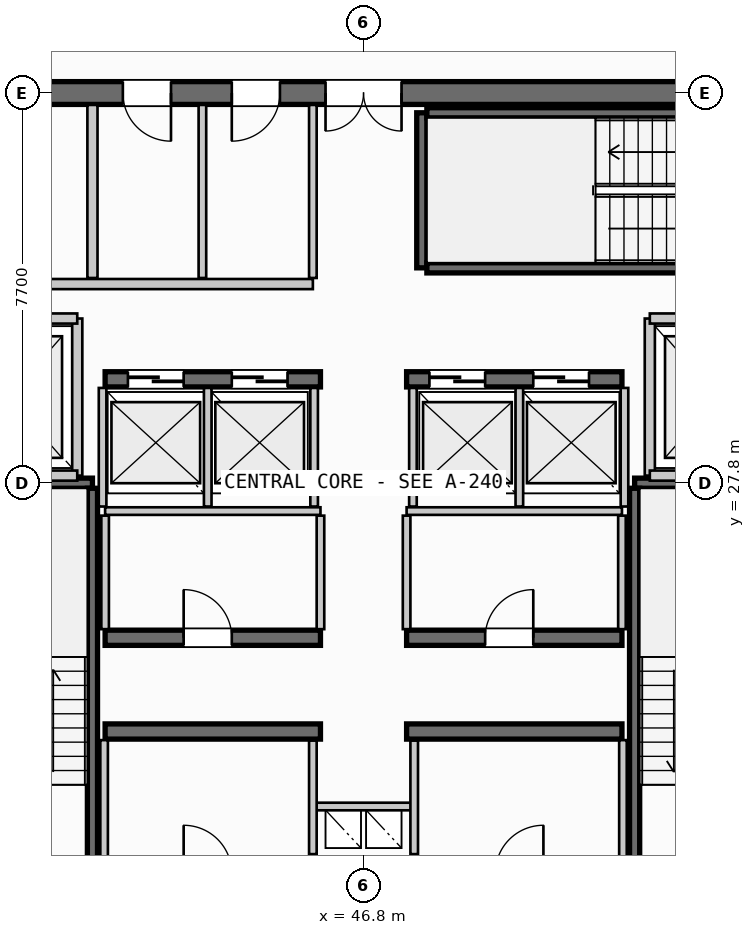
"""IFC4 building model, lengths in metres.
Left out: names, types, materials, properties, quantities, classifications, styles, units other than length and angle.
Written with IfcOpenShell. Run it as: python <this file> out.ifc"""

import sys

from ifc_helpers import new_model, si_unit, direction, frame, frame_2d, origin, place, context, subcontext, project, spatial, rectangle, extrude, source, transform, mapped, element, fill, save


model = new_model("IFC4")
c1 = context("Model", 3, precision=1e-05, world=origin(), true_north=direction((0.0, 1.0)))
c2 = subcontext(c1, "Body", "Model", "MODEL_VIEW")
j1 = project(units=[si_unit("LENGTHUNIT", "METRE"), si_unit("PLANEANGLEUNIT", "RADIAN")], contexts=[c1])
p1 = place(None, origin())
s1 = spatial("IfcSite", under=j1, at=p1, CompositionType="ELEMENT")
p2 = place(p1, origin())
s2 = spatial("IfcBuilding", under=s1, at=p2, CompositionType="ELEMENT")
p3 = place(p2, frame((0.0, 0.0, 290.5)))
s3 = spatial("IfcBuildingStorey", under=s2, at=p3, CompositionType="ELEMENT", Elevation=290.5)
p4 = place(p3, frame((55.6, 35.5, 0.0), z_axis=(0.0, 0.0, 1.0), x_axis=(-1.0, 0.0, 0.0)))
e1 = element("IfcWall", 1, at=p4, inside=s3, PredefinedType="SHEAR", context=c2, shape_type="SweptSolid", body=[
    extrude(rectangle(XDim=17.6, YDim=0.45, at=frame_2d((8.8, 0.0))), origin(), (0.0, 0.0, 1.0), 3.21),
])
p5 = place(p4, frame((8.05, 0.0, 0.0)))
e2 = element("IfcOpeningElement", 2, at=p5, cuts=e1, PredefinedType="OPENING", context=c2, shape_type="SweptSolid", body=[
    extrude(rectangle(XDim=1.5, YDim=2.2, at=frame_2d((0.75, 1.1))), frame((0.0, 0.235, 0.0), z_axis=(0.0, -1.0, 0.0), x_axis=(1.0, 0.0, 0.0)), (0.0, 0.0, 1.0), 0.47),
])
p6 = place(p4, frame((15.1, 0.0, 0.0)))
e3 = element("IfcOpeningElement", 3, at=p6, cuts=e1, PredefinedType="OPENING", context=c2, shape_type="SweptSolid", body=[
    extrude(rectangle(XDim=0.95, YDim=2.15, at=frame_2d((0.475, 1.075))), frame((0.0, 0.235, 0.0), z_axis=(0.0, -1.0, 0.0), x_axis=(1.0, 0.0, 0.0)), (0.0, 0.0, 1.0), 0.47),
])
p7 = place(p4, frame((12.6, 0.0, 0.0)))
e4 = element("IfcOpeningElement", 4, at=p7, cuts=e1, PredefinedType="OPENING", context=c2, shape_type="SweptSolid", body=[
    extrude(rectangle(XDim=0.95, YDim=2.15, at=frame_2d((0.475, 1.075))), frame((0.0, 0.235, 0.0), z_axis=(0.0, -1.0, 0.0), x_axis=(1.0, 0.0, 0.0)), (0.0, 0.0, 1.0), 0.47),
])
p8 = place(p4, frame((10.45, 0.0, 0.0)))
e5 = element("IfcOpeningElement", 5, at=p8, cuts=e1, PredefinedType="OPENING", context=c2, shape_type="SweptSolid", body=[
    extrude(rectangle(XDim=0.95, YDim=2.15, at=frame_2d((0.475, 1.075))), frame((0.0, 0.235, 0.0), z_axis=(0.0, -1.0, 0.0), x_axis=(1.0, 0.0, 0.0)), (0.0, 0.0, 1.0), 0.47),
])
for number, where, z_axis, x_axis in (
    (6, (41.7, 22.9, 0.0), (0.0, 0.0, 1.0), (1.0, 0.0, 0.0)),
    (7, (47.65, 22.9, 0.0), (0.0, 0.0, 1.0), (1.0, 0.0, 0.0)),
):
    element("IfcWall", number, at=place(p3, frame(where, z_axis=z_axis, x_axis=x_axis)), inside=s3, PredefinedType="SHEAR", context=c2, shape_type="SweptSolid", body=[
        extrude(rectangle(XDim=4.25, YDim=0.3, at=frame_2d((2.125, 0.0))), origin(), (0.0, 0.0, 1.0), 3.21),
    ])
p9 = place(p3, frame((41.7, 24.75, 0.0), z_axis=(0.0, 0.0, 1.0), x_axis=(1.0, 0.0, 0.0)))
e8 = element("IfcWall", 8, at=p9, inside=s3, PredefinedType="SHEAR", context=c2, shape_type="SweptSolid", body=[
    extrude(rectangle(XDim=4.25, YDim=0.3, at=frame_2d((2.125, 0.0))), origin(), (0.0, 0.0, 1.0), 3.21),
])
p10 = place(p9, frame((1.55, 0.0, 0.0)))
e9 = element("IfcOpeningElement", 9, at=p10, cuts=e8, PredefinedType="OPENING", context=c2, shape_type="SweptSolid", body=[
    extrude(rectangle(XDim=0.95, YDim=2.15, at=frame_2d((0.475, 1.075))), frame((0.0, 0.16, 0.0), z_axis=(0.0, -1.0, 0.0), x_axis=(1.0, 0.0, 0.0)), (0.0, 0.0, 1.0), 0.32),
])
p11 = place(p3, frame((47.65, 24.75, 0.0), z_axis=(0.0, 0.0, 1.0), x_axis=(1.0, 0.0, 0.0)))
e10 = element("IfcWall", 10, at=p11, inside=s3, PredefinedType="SHEAR", context=c2, shape_type="SweptSolid", body=[
    extrude(rectangle(XDim=4.25, YDim=0.3, at=frame_2d((2.125, 0.0))), origin(), (0.0, 0.0, 1.0), 3.21),
])
p12 = place(p11, frame((1.55, 0.0, 0.0)))
e11 = element("IfcOpeningElement", 11, at=p12, cuts=e10, PredefinedType="OPENING", context=c2, shape_type="SweptSolid", body=[
    extrude(rectangle(XDim=0.95, YDim=2.15, at=frame_2d((0.475, 1.075))), frame((0.0, 0.16, 0.0), z_axis=(0.0, -1.0, 0.0), x_axis=(1.0, 0.0, 0.0)), (0.0, 0.0, 1.0), 0.32),
])
p13 = place(p3, frame((41.7, 29.85, 0.0), z_axis=(0.0, 0.0, 1.0), x_axis=(1.0, 0.0, 0.0)))
e12 = element("IfcWall", 12, at=p13, inside=s3, PredefinedType="SHEAR", context=c2, shape_type="SweptSolid", body=[
    extrude(rectangle(XDim=4.25, YDim=0.3, at=frame_2d((2.125, 0.0))), origin(), (0.0, 0.0, 1.0), 3.21),
])
p14 = place(p13, frame((0.45, 0.0, 0.0)))
e13 = element("IfcOpeningElement", 13, at=p14, cuts=e12, PredefinedType="OPENING", context=c2, shape_type="SweptSolid", body=[
    extrude(rectangle(XDim=1.1, YDim=2.2, at=frame_2d((0.55, 1.1))), frame((0.0, 0.16, 0.0), z_axis=(0.0, -1.0, 0.0), x_axis=(1.0, 0.0, 0.0)), (0.0, 0.0, 1.0), 0.32),
])
p15 = place(p13, frame((2.5, 0.0, 0.0)))
e14 = element("IfcOpeningElement", 14, at=p15, cuts=e12, PredefinedType="OPENING", context=c2, shape_type="SweptSolid", body=[
    extrude(rectangle(XDim=1.1, YDim=2.2, at=frame_2d((0.55, 1.1))), frame((0.0, 0.16, 0.0), z_axis=(0.0, -1.0, 0.0), x_axis=(1.0, 0.0, 0.0)), (0.0, 0.0, 1.0), 0.32),
])
p16 = place(p3, frame((47.65, 29.85, 0.0), z_axis=(0.0, 0.0, 1.0), x_axis=(1.0, 0.0, 0.0)))
e15 = element("IfcWall", 15, at=p16, inside=s3, PredefinedType="SHEAR", context=c2, shape_type="SweptSolid", body=[
    extrude(rectangle(XDim=4.25, YDim=0.3, at=frame_2d((2.125, 0.0))), origin(), (0.0, 0.0, 1.0), 3.21),
])
p17 = place(p16, frame((0.45, 0.0, 0.0)))
e16 = element("IfcOpeningElement", 16, at=p17, cuts=e15, PredefinedType="OPENING", context=c2, shape_type="SweptSolid", body=[
    extrude(rectangle(XDim=1.1, YDim=2.2, at=frame_2d((0.55, 1.1))), frame((0.0, 0.16, 0.0), z_axis=(0.0, -1.0, 0.0), x_axis=(1.0, 0.0, 0.0)), (0.0, 0.0, 1.0), 0.32),
])
p18 = place(p16, frame((2.5, 0.0, 0.0)))
e17 = element("IfcOpeningElement", 17, at=p18, cuts=e15, PredefinedType="OPENING", context=c2, shape_type="SweptSolid", body=[
    extrude(rectangle(XDim=1.1, YDim=2.2, at=frame_2d((0.55, 1.1))), frame((0.0, 0.16, 0.0), z_axis=(0.0, -1.0, 0.0), x_axis=(1.0, 0.0, 0.0)), (0.0, 0.0, 1.0), 0.32),
])
p19 = place(p3, frame((38.39, 27.8, 0.0), z_axis=(0.0, 0.0, 1.0), x_axis=(1.0, 0.0, 0.0)))
e18 = element("IfcWall", 18, at=p19, inside=s3, PredefinedType="SHEAR", context=c2, shape_type="SweptSolid", body=[
    extrude(rectangle(XDim=3.06, YDim=0.2, at=frame_2d((1.53, 0.0))), origin(), (0.0, 0.0, 1.0), 3.21),
])
p20 = place(p3, frame((41.45, 27.7, 0.0), z_axis=(0.0, 0.0, 1.0), x_axis=(0.0, -1.0, 0.0)))
e19 = element("IfcWall", 19, at=p20, inside=s3, PredefinedType="SHEAR", context=c2, shape_type="SweptSolid", body=[
    extrude(rectangle(XDim=7.35, YDim=0.2, at=frame_2d((3.675, 0.0))), origin(), (0.0, 0.0, 1.0), 3.21),
])
p21 = place(p3, frame((52.15, 27.8, 0.0), z_axis=(0.0, 0.0, 1.0), x_axis=(1.0, 0.0, 0.0)))
e20 = element("IfcWall", 20, at=p21, inside=s3, PredefinedType="SHEAR", context=c2, shape_type="SweptSolid", body=[
    extrude(rectangle(XDim=3.06, YDim=0.2, at=frame_2d((1.53, 0.0))), origin(), (0.0, 0.0, 1.0), 3.21),
])
p22 = place(p3, frame((52.15, 20.35, 0.0), z_axis=(0.0, 0.0, 1.0), x_axis=(0.0, 1.0, 0.0)))
e21 = element("IfcWall", 21, at=p22, inside=s3, PredefinedType="SHEAR", context=c2, shape_type="SweptSolid", body=[
    extrude(rectangle(XDim=7.35, YDim=0.2, at=frame_2d((3.675, 0.0))), origin(), (0.0, 0.0, 1.0), 3.21),
])
p23 = place(p3, frame((47.95, 32.05, 0.0), z_axis=(0.0, 0.0, 1.0), x_axis=(0.0, 1.0, 0.0)))
e22 = element("IfcWall", 22, at=p23, inside=s3, PredefinedType="SHEAR", context=c2, shape_type="SweptSolid", body=[
    extrude(rectangle(XDim=3.06, YDim=0.2, at=frame_2d((1.53, 0.0))), origin(), (0.0, 0.0, 1.0), 3.21),
])
for number, where, z_axis, x_axis in (
    (23, (48.05, 35.11, 0.0), (0.0, 0.0, 1.0), (1.0, 0.0, 0.0)),
    (24, (55.4, 32.05, 0.0), (0.0, 0.0, 1.0), (-1.0, 0.0, 0.0)),
):
    element("IfcWall", number, at=place(p3, frame(where, z_axis=z_axis, x_axis=x_axis)), inside=s3, PredefinedType="SHEAR", context=c2, shape_type="SweptSolid", body=[
        extrude(rectangle(XDim=7.35, YDim=0.2, at=frame_2d((3.675, 0.0))), origin(), (0.0, 0.0, 1.0), 3.21),
    ])
p24 = place(p3, frame((45.8, 21.42, 0.0), z_axis=(0.0, 0.0, 1.0), x_axis=(1.0, 0.0, 0.0)))
e25 = element("IfcWall", 25, at=p24, inside=s3, PredefinedType="PARTITIONING", context=c2, shape_type="SweptSolid", body=[
    extrude(rectangle(XDim=2.0, YDim=0.15, at=frame_2d((1.0, 0.0))), origin(), (0.0, 0.0, 1.0), 2.315),
])
for number, where, z_axis, x_axis in (
    (26, (45.8, 20.48, 0.0), (0.0, 0.0, 1.0), (0.0, 1.0, 0.0)),
    (27, (47.8, 20.48, 0.0), (0.0, 0.0, 1.0), (0.0, 1.0, 0.0)),
):
    element("IfcWall", number, at=place(p3, frame(where, z_axis=z_axis, x_axis=x_axis)), inside=s3, PredefinedType="PARTITIONING", context=c2, shape_type="SweptSolid", body=[
        extrude(rectangle(XDim=2.24, YDim=0.15, at=frame_2d((1.12, 0.0))), origin(), (0.0, 0.0, 1.0), 2.315),
    ])
p25 = place(p3, frame((41.15, 27.95, 0.0), z_axis=(0.0, 0.0, 1.0), x_axis=(0.0, 1.0, 0.0)))
e28 = element("IfcWall", 28, at=p25, inside=s3, PredefinedType="PARTITIONING", context=c2, shape_type="SweptSolid", body=[
    extrude(rectangle(XDim=3.1, YDim=0.2, at=frame_2d((1.55, 0.0))), origin(), (0.0, 0.0, 1.0), 2.315),
])
for number, where, z_axis, x_axis in (
    (29, (38.235, 27.95, 0.0), (0.0, 0.0, 1.0), (1.0, 0.0, 0.0)),
    (30, (38.235, 31.05, 0.0), (0.0, 0.0, 1.0), (1.0, 0.0, 0.0)),
):
    element("IfcWall", number, at=place(p3, frame(where, z_axis=z_axis, x_axis=x_axis)), inside=s3, PredefinedType="PARTITIONING", context=c2, shape_type="SweptSolid", body=[
        extrude(rectangle(XDim=2.915, YDim=0.2, at=frame_2d((1.458, 0.0))), origin(), (0.0, 0.0, 1.0), 2.315),
    ])
p26 = place(p3, frame((52.45, 27.95, 0.0), z_axis=(0.0, 0.0, 1.0), x_axis=(0.0, 1.0, 0.0)))
e31 = element("IfcWall", 31, at=p26, inside=s3, PredefinedType="PARTITIONING", context=c2, shape_type="SweptSolid", body=[
    extrude(rectangle(XDim=3.1, YDim=0.2, at=frame_2d((1.55, 0.0))), origin(), (0.0, 0.0, 1.0), 2.315),
])
for number, where, z_axis, x_axis in (
    (32, (52.45, 27.95, 0.0), (0.0, 0.0, 1.0), (1.0, 0.0, 0.0)),
    (33, (52.45, 31.05, 0.0), (0.0, 0.0, 1.0), (1.0, 0.0, 0.0)),
):
    element("IfcWall", number, at=place(p3, frame(where, z_axis=z_axis, x_axis=x_axis)), inside=s3, PredefinedType="PARTITIONING", context=c2, shape_type="SweptSolid", body=[
        extrude(rectangle(XDim=2.915, YDim=0.2, at=frame_2d((1.458, 0.0))), origin(), (0.0, 0.0, 1.0), 2.315),
    ])
for number, where, z_axis, x_axis in (
    (34, (41.68, 20.335, 0.0), (0.0, 0.0, 1.0), (0.0, 1.0, 0.0)),
    (35, (51.92, 20.335, 0.0), (0.0, 0.0, 1.0), (0.0, 1.0, 0.0)),
):
    element("IfcWall", number, at=place(p3, frame(where, z_axis=z_axis, x_axis=x_axis)), inside=s3, PredefinedType="PARTITIONING", context=c2, shape_type="SweptSolid", body=[
        extrude(rectangle(XDim=2.395, YDim=0.15, at=frame_2d((1.198, 0.0))), origin(), (0.0, 0.0, 1.0), 2.315),
    ])
for number, where, z_axis, x_axis in (
    (36, (41.7, 27.25, 0.0), (0.0, 0.0, 1.0), (1.0, 0.0, 0.0)),
    (37, (47.65, 27.25, 0.0), (0.0, 0.0, 1.0), (1.0, 0.0, 0.0)),
):
    element("IfcWall", number, at=place(p3, frame(where, z_axis=z_axis, x_axis=x_axis)), inside=s3, PredefinedType="PARTITIONING", context=c2, shape_type="SweptSolid", body=[
        extrude(rectangle(XDim=4.25, YDim=0.15, at=frame_2d((2.125, 0.0))), origin(), (0.0, 0.0, 1.0), 2.315),
    ])
for number, where, z_axis, x_axis in (
    (38, (41.7, 24.92, 0.0), (0.0, 0.0, 1.0), (0.0, 1.0, 0.0)),
    (39, (45.95, 24.92, 0.0), (0.0, 0.0, 1.0), (0.0, 1.0, 0.0)),
    (40, (47.65, 24.92, 0.0), (0.0, 0.0, 1.0), (0.0, 1.0, 0.0)),
    (41, (51.9, 24.92, 0.0), (0.0, 0.0, 1.0), (0.0, 1.0, 0.0)),
):
    element("IfcWall", number, at=place(p3, frame(where, z_axis=z_axis, x_axis=x_axis)), inside=s3, PredefinedType="PARTITIONING", context=c2, shape_type="SweptSolid", body=[
        extrude(rectangle(XDim=2.24, YDim=0.15, at=frame_2d((1.12, 0.0))), origin(), (0.0, 0.0, 1.0), 2.315),
    ])
for number, where, z_axis, x_axis in (
    (42, (41.65, 27.34, 0.0), (0.0, 0.0, 1.0), (0.0, 1.0, 0.0)),
    (43, (43.725, 27.34, 0.0), (0.0, 0.0, 1.0), (0.0, 1.0, 0.0)),
    (44, (45.825, 27.34, 0.0), (0.0, 0.0, 1.0), (0.0, 1.0, 0.0)),
    (45, (47.775, 27.34, 0.0), (0.0, 0.0, 1.0), (0.0, 1.0, 0.0)),
    (46, (49.875, 27.34, 0.0), (0.0, 0.0, 1.0), (0.0, 1.0, 0.0)),
    (47, (51.95, 27.34, 0.0), (0.0, 0.0, 1.0), (0.0, 1.0, 0.0)),
):
    element("IfcWall", number, at=place(p3, frame(where, z_axis=z_axis, x_axis=x_axis)), inside=s3, PredefinedType="PARTITIONING", context=c2, shape_type="SweptSolid", body=[
        extrude(rectangle(XDim=2.34, YDim=0.15, at=frame_2d((1.17, 0.0))), origin(), (0.0, 0.0, 1.0), 2.315),
    ])
p27 = place(p3, frame((41.45, 31.85, 0.0), z_axis=(0.0, 0.0, 1.0), x_axis=(0.0, 1.0, 0.0)))
e48 = element("IfcWall", 48, at=p27, inside=s3, PredefinedType="PARTITIONING", context=c2, shape_type="SweptSolid", body=[
    extrude(rectangle(XDim=3.415, YDim=0.2, at=frame_2d((1.708, 0.0))), origin(), (0.0, 0.0, 1.0), 2.315),
])
p28 = place(p3, frame((38.235, 31.73, 0.0), z_axis=(0.0, 0.0, 1.0), x_axis=(1.0, 0.0, 0.0)))
e49 = element("IfcWall", 49, at=p28, inside=s3, PredefinedType="PARTITIONING", context=c2, shape_type="SweptSolid", body=[
    extrude(rectangle(XDim=7.565, YDim=0.2, at=frame_2d((3.782, 0.0))), origin(), (0.0, 0.0, 1.0), 2.315),
])
p29 = place(p3, frame((45.8, 31.85, 0.0), z_axis=(0.0, 0.0, 1.0), x_axis=(0.0, 1.0, 0.0)))
e50 = element("IfcWall", 50, at=p29, inside=s3, PredefinedType="PARTITIONING", context=c2, shape_type="SweptSolid", body=[
    extrude(rectangle(XDim=3.415, YDim=0.15, at=frame_2d((1.708, 0.0))), origin(), (0.0, 0.0, 1.0), 2.315),
])
p30 = place(p3, frame((43.62, 31.85, 0.0), z_axis=(0.0, 0.0, 1.0), x_axis=(0.0, 1.0, 0.0)))
e51 = element("IfcWall", 51, at=p30, inside=s3, PredefinedType="PLUMBINGWALL", context=c2, shape_type="SweptSolid", body=[
    extrude(rectangle(XDim=3.415, YDim=0.15, at=frame_2d((1.708, 0.0))), origin(), (0.0, 0.0, 1.0), 2.315),
])
m1 = source(origin(), c2, "Body", "SweptSolid", [
    extrude(rectangle(XDim=1.5, YDim=2.2, at=frame_2d((0.75, 1.1))), frame((0.0, 0.025, 0.0), z_axis=(0.0, -1.0, 0.0), x_axis=(1.0, 0.0, 0.0)), (0.0, 0.0, 1.0), 0.05),
])
p31 = place(p5, origin())
e52 = element("IfcDoor", 52, at=p31, inside=s3, OperationType="DOUBLE_DOOR_SINGLE_SWING", PredefinedType="DOOR", context=c2, shape_type="MappedRepresentation", body=[
    mapped(m1, transform((0.0, 0.0, 0.0), scale=1.0)),
])
fill(e2, e52)
m2 = source(origin(), c2, "Body", "SweptSolid", [
    extrude(rectangle(XDim=0.95, YDim=2.15, at=frame_2d((0.475, 1.075))), frame((0.0, 0.025, 0.0), z_axis=(0.0, -1.0, 0.0), x_axis=(1.0, 0.0, 0.0)), (0.0, 0.0, 1.0), 0.05),
])
p32 = place(p10, origin())
e53 = element("IfcDoor", 53, at=p32, inside=s3, OperationType="SINGLE_SWING_LEFT", PredefinedType="DOOR", context=c2, shape_type="MappedRepresentation", body=[
    mapped(m2, transform((0.0, 0.0, 0.0), scale=1.0)),
])
fill(e9, e53)
p33 = place(p12, origin())
e54 = element("IfcDoor", 54, at=p33, inside=s3, OperationType="SINGLE_SWING_RIGHT", PredefinedType="DOOR", context=c2, shape_type="MappedRepresentation", body=[
    mapped(m2, transform((0.0, 0.0, 0.0), scale=1.0)),
])
fill(e11, e54)
m3 = source(origin(), c2, "Body", "SweptSolid", [
    extrude(rectangle(XDim=1.1, YDim=2.2, at=frame_2d((0.55, 1.1))), frame((0.0, 0.025, 0.0), z_axis=(0.0, -1.0, 0.0), x_axis=(1.0, 0.0, 0.0)), (0.0, 0.0, 1.0), 0.05),
])
p34 = place(p14, origin())
e55 = element("IfcDoor", 55, at=p34, inside=s3, OperationType="SLIDING_TO_LEFT", PredefinedType="DOOR", context=c2, shape_type="MappedRepresentation", body=[
    mapped(m3, transform((0.0, 0.0, 0.0), scale=1.0)),
])
fill(e13, e55)
p35 = place(p15, origin())
e56 = element("IfcDoor", 56, at=p35, inside=s3, OperationType="SLIDING_TO_LEFT", PredefinedType="DOOR", context=c2, shape_type="MappedRepresentation", body=[
    mapped(m3, transform((0.0, 0.0, 0.0), scale=1.0)),
])
fill(e14, e56)
p36 = place(p17, origin())
e57 = element("IfcDoor", 57, at=p36, inside=s3, OperationType="SLIDING_TO_LEFT", PredefinedType="DOOR", context=c2, shape_type="MappedRepresentation", body=[
    mapped(m3, transform((0.0, 0.0, 0.0), scale=1.0)),
])
fill(e16, e57)
p37 = place(p18, origin())
e58 = element("IfcDoor", 58, at=p37, inside=s3, OperationType="SLIDING_TO_LEFT", PredefinedType="DOOR", context=c2, shape_type="MappedRepresentation", body=[
    mapped(m3, transform((0.0, 0.0, 0.0), scale=1.0)),
])
fill(e17, e58)
p38 = place(p7, origin())
e59 = element("IfcDoor", 59, at=p38, inside=s3, OperationType="SINGLE_SWING_LEFT", PredefinedType="DOOR", context=c2, shape_type="MappedRepresentation", body=[
    mapped(m2, transform((0.0, 0.0, 0.0), scale=1.0)),
])
fill(e4, e59)
p39 = place(p8, origin())
e60 = element("IfcDoor", 60, at=p39, inside=s3, OperationType="SINGLE_SWING_RIGHT", PredefinedType="DOOR", context=c2, shape_type="MappedRepresentation", body=[
    mapped(m2, transform((0.0, 0.0, 0.0), scale=1.0)),
])
fill(e5, e60)
save(model, sys.argv[1])
